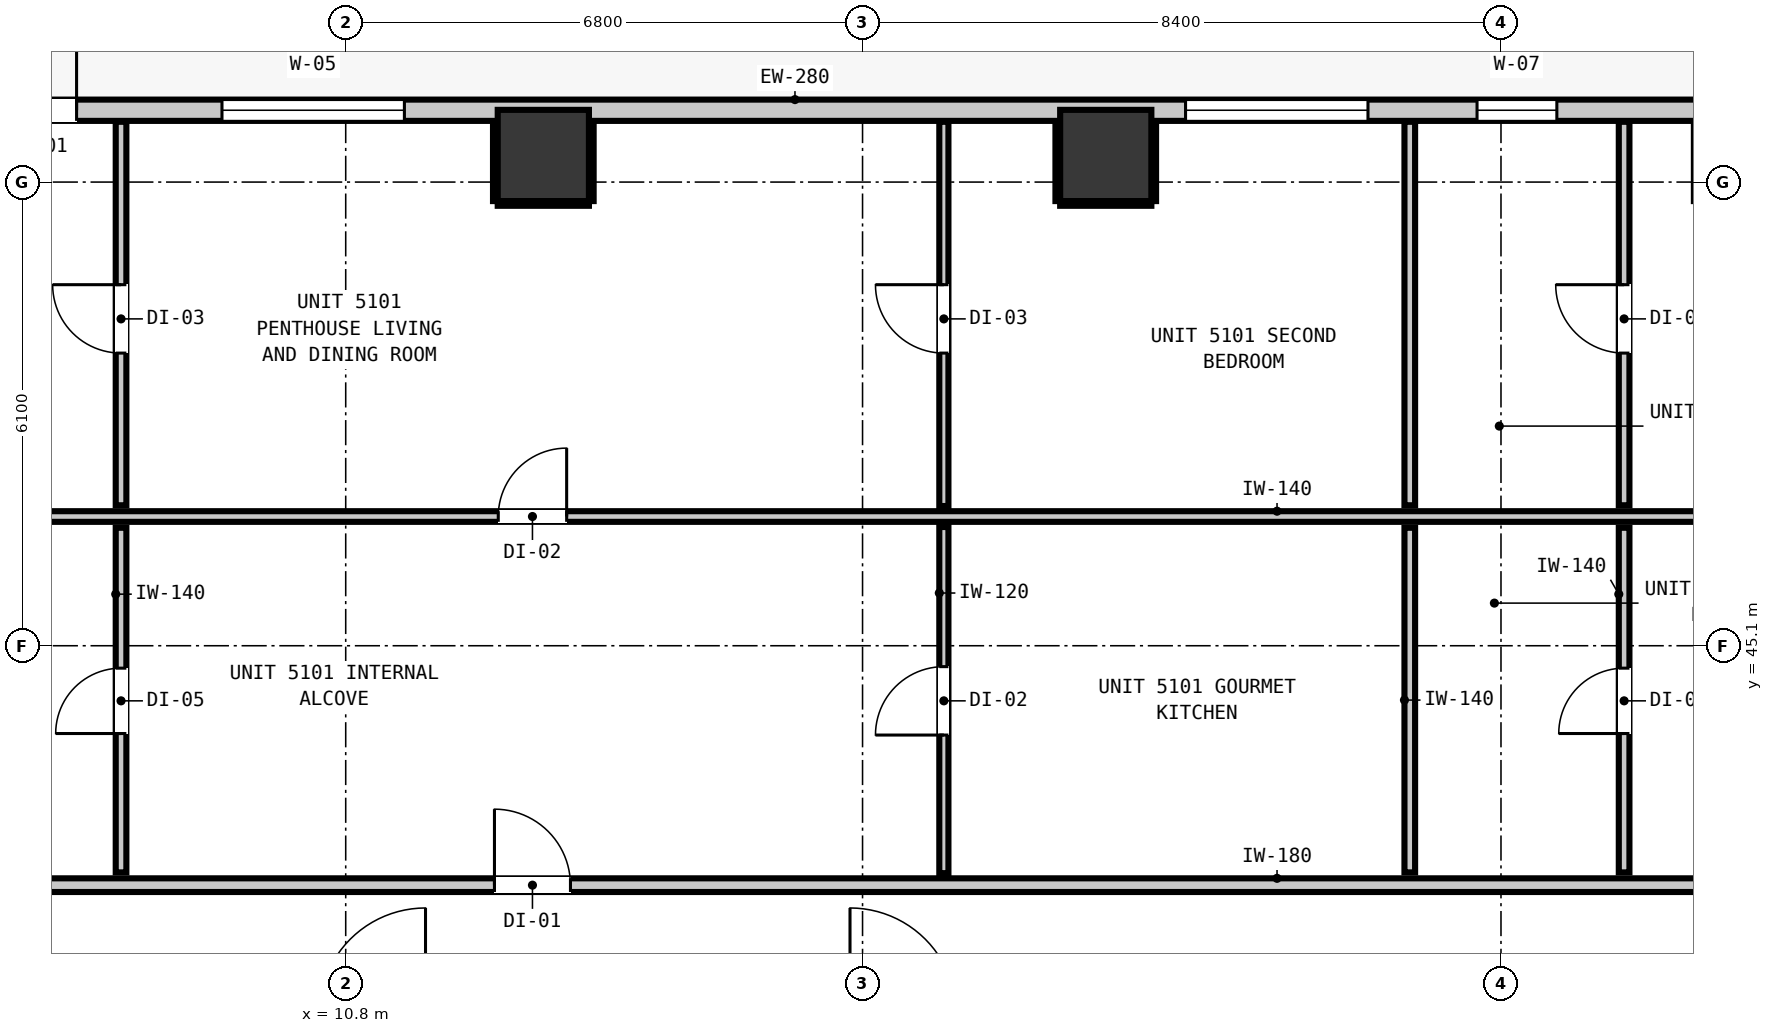
"""IFC4 building model, lengths in metres.
Left out: names, types, materials, properties, quantities, classifications, styles, units other than length and angle.
Written with IfcOpenShell. Run it as: python <this file> out.ifc"""

import sys

from ifc_helpers import new_model, si_unit, direction, frame, frame_2d, origin, origin_2d, place, context, subcontext, project, spatial, rectangle, extrude, element, fill, save


model = new_model("IFC4")
c1 = context("Model", 3, precision=1e-05, world=origin(), true_north=direction((0.0, 1.0)))
c2 = subcontext(c1, "Body", "Model", "MODEL_VIEW")
j1 = project(units=[si_unit("LENGTHUNIT", "METRE"), si_unit("PLANEANGLEUNIT", "RADIAN")], contexts=[c1])
p1 = place(None, origin())
s1 = spatial("IfcSite", under=j1, at=p1, CompositionType="ELEMENT")
p2 = place(p1, origin())
s2 = spatial("IfcBuilding", under=s1, at=p2, CompositionType="ELEMENT")
p3 = place(p2, frame((0.0, 0.0, 176.88)))
s3 = spatial("IfcBuildingStorey", under=s2, at=p3, CompositionType="ELEMENT", Elevation=176.88)
for number, where, z_axis, x_axis in (
    (1, (13.4, 51.55, 0.0), (0.0, 0.0, 1.0), (1.0, 0.0, 0.0)),
    (2, (20.8, 51.55, 0.0), (0.0, 0.0, 1.0), (1.0, 0.0, 0.0)),
):
    element("IfcColumn", number, at=place(p3, frame(where, z_axis=z_axis, x_axis=x_axis)), inside=s3, PredefinedType="COLUMN", context=c2, shape_type="SweptSolid", body=[
        extrude(rectangle(XDim=1.2, YDim=1.2, at=origin_2d()), origin(), (0.0, 0.0, 1.0), 3.32),
    ])
p4 = place(p3, frame((5.355, 52.145, 0.0), z_axis=(0.0, 0.0, 1.0), x_axis=(1.0, 0.0, 0.0)))
e3 = element("IfcWall", 3, at=p4, inside=s3, PredefinedType="STANDARD", context=c2, shape_type="SweptSolid", body=[
    extrude(rectangle(XDim=35.09, YDim=0.28, at=frame_2d((17.545, 0.0))), origin(), (0.0, 0.0, 1.0), 3.08),
])
p5 = place(p4, frame((0.904, 0.0, 0.0)))
e4 = element("IfcOpeningElement", 4, at=p5, cuts=e3, PredefinedType="OPENING", context=c2, shape_type="SweptSolid", body=[
    extrude(rectangle(XDim=1.0, YDim=2.15, at=frame_2d((0.5, 1.075))), frame((0.0, 0.15, 0.0), z_axis=(0.0, -1.0, 0.0), x_axis=(1.0, 0.0, 0.0)), (0.0, 0.0, 1.0), 0.3),
])
p6 = place(p4, frame((3.817, 0.0, 0.85)))
e5 = element("IfcOpeningElement", 5, at=p6, cuts=e3, PredefinedType="OPENING", context=c2, shape_type="SweptSolid", body=[
    extrude(rectangle(XDim=2.4, YDim=1.95, at=frame_2d((1.2, 0.975))), frame((0.0, 0.15, 0.0), z_axis=(0.0, -1.0, 0.0), x_axis=(1.0, 0.0, 0.0)), (0.0, 0.0, 1.0), 0.3),
])
p7 = place(p4, frame((16.495, 0.0, 0.85)))
e6 = element("IfcOpeningElement", 6, at=p7, cuts=e3, PredefinedType="OPENING", context=c2, shape_type="SweptSolid", body=[
    extrude(rectangle(XDim=2.4, YDim=1.95, at=frame_2d((1.2, 0.975))), frame((0.0, 0.15, 0.0), z_axis=(0.0, -1.0, 0.0), x_axis=(1.0, 0.0, 0.0)), (0.0, 0.0, 1.0), 0.3),
])
p8 = place(p4, frame((26.295, 0.0, 0.85)))
e7 = element("IfcOpeningElement", 7, at=p8, cuts=e3, PredefinedType="OPENING", context=c2, shape_type="SweptSolid", body=[
    extrude(rectangle(XDim=2.4, YDim=1.95, at=frame_2d((1.2, 0.975))), frame((0.0, 0.15, 0.0), z_axis=(0.0, -1.0, 0.0), x_axis=(1.0, 0.0, 0.0)), (0.0, 0.0, 1.0), 0.3),
])
p9 = place(p4, frame((20.33, 0.0, 0.85)))
e8 = element("IfcOpeningElement", 8, at=p9, cuts=e3, PredefinedType="OPENING", context=c2, shape_type="SweptSolid", body=[
    extrude(rectangle(XDim=1.05, YDim=1.65, at=frame_2d((0.525, 0.825))), frame((0.0, 0.15, 0.0), z_axis=(0.0, -1.0, 0.0), x_axis=(1.0, 0.0, 0.0)), (0.0, 0.0, 1.0), 0.3),
])
p10 = place(p4, frame((33.387, 0.0, 0.85)))
e9 = element("IfcOpeningElement", 9, at=p10, cuts=e3, PredefinedType="OPENING", context=c2, shape_type="SweptSolid", body=[
    extrude(rectangle(XDim=1.05, YDim=1.65, at=frame_2d((0.525, 0.825))), frame((0.0, 0.15, 0.0), z_axis=(0.0, -1.0, 0.0), x_axis=(1.0, 0.0, 0.0)), (0.0, 0.0, 1.0), 0.3),
])
p11 = place(p3, frame((3.207, 41.95, 0.0), z_axis=(0.0, 0.0, 1.0), x_axis=(1.0, 0.0, 0.0)))
e10 = element("IfcWall", 10, at=p11, inside=s3, PredefinedType="PARTITIONING", context=c2, shape_type="SweptSolid", body=[
    extrude(rectangle(XDim=39.386, YDim=0.18, at=frame_2d((19.693, 0.0))), origin(), (0.0, 0.0, 1.0), 3.08),
])
p12 = place(p11, frame((9.55, 0.0, 0.0)))
e11 = element("IfcOpeningElement", 11, at=p12, cuts=e10, PredefinedType="OPENING", context=c2, shape_type="SweptSolid", body=[
    extrude(rectangle(XDim=1.0, YDim=2.15, at=frame_2d((0.5, 1.075))), frame((0.0, 0.1, 0.0), z_axis=(0.0, -1.0, 0.0), x_axis=(1.0, 0.0, 0.0)), (0.0, 0.0, 1.0), 0.2),
])
p13 = place(p11, frame((29.143, 0.0, 0.0)))
e12 = element("IfcOpeningElement", 12, at=p13, cuts=e10, PredefinedType="OPENING", context=c2, shape_type="SweptSolid", body=[
    extrude(rectangle(XDim=1.0, YDim=2.15, at=frame_2d((0.5, 1.075))), frame((0.0, 0.1, 0.0), z_axis=(0.0, -1.0, 0.0), x_axis=(1.0, 0.0, 0.0)), (0.0, 0.0, 1.0), 0.2),
])
p14 = place(p3, frame((3.207, 46.8, 0.0), z_axis=(0.0, 0.0, 1.0), x_axis=(1.0, 0.0, 0.0)))
e13 = element("IfcWall", 13, at=p14, inside=s3, PredefinedType="PARTITIONING", context=c2, shape_type="SweptSolid", body=[
    extrude(rectangle(XDim=39.386, YDim=0.14, at=frame_2d((19.693, 0.0))), origin(), (0.0, 0.0, 1.0), 3.08),
])
p15 = place(p14, frame((9.6, 0.0, 0.0)))
e14 = element("IfcOpeningElement", 14, at=p15, cuts=e13, PredefinedType="OPENING", context=c2, shape_type="SweptSolid", body=[
    extrude(rectangle(XDim=0.9, YDim=2.1, at=frame_2d((0.45, 1.05))), frame((0.0, 0.08, 0.0), z_axis=(0.0, -1.0, 0.0), x_axis=(1.0, 0.0, 0.0)), (0.0, 0.0, 1.0), 0.16),
])
p16 = place(p14, frame((29.193, 0.0, 0.0)))
e15 = element("IfcOpeningElement", 15, at=p16, cuts=e13, PredefinedType="OPENING", context=c2, shape_type="SweptSolid", body=[
    extrude(rectangle(XDim=0.9, YDim=2.1, at=frame_2d((0.45, 1.05))), frame((0.0, 0.08, 0.0), z_axis=(0.0, -1.0, 0.0), x_axis=(1.0, 0.0, 0.0)), (0.0, 0.0, 1.0), 0.16),
])
p17 = place(p3, frame((7.844, 42.118, 0.0), z_axis=(0.0, 0.0, 1.0), x_axis=(0.0, 1.0, 0.0)))
e16 = element("IfcWall", 16, at=p17, inside=s3, PredefinedType="PARTITIONING", context=c2, shape_type="SweptSolid", body=[
    extrude(rectangle(XDim=4.534, YDim=0.14, at=frame_2d((2.267, 0.0))), origin(), (0.0, 0.0, 1.0), 3.08),
])
p18 = place(p17, frame((1.827, 0.0, 0.0)))
e17 = element("IfcOpeningElement", 17, at=p18, cuts=e16, PredefinedType="OPENING", context=c2, shape_type="SweptSolid", body=[
    extrude(rectangle(XDim=0.86, YDim=2.02, at=frame_2d((0.43, 1.01))), frame((0.0, 0.08, 0.0), z_axis=(0.0, -1.0, 0.0), x_axis=(1.0, 0.0, 0.0)), (0.0, 0.0, 1.0), 0.16),
])
p19 = place(p3, frame((7.844, 46.948, 0.0), z_axis=(0.0, 0.0, 1.0), x_axis=(0.0, 1.0, 0.0)))
e18 = element("IfcWall", 18, at=p19, inside=s3, PredefinedType="PARTITIONING", context=c2, shape_type="SweptSolid", body=[
    extrude(rectangle(XDim=5.045, YDim=0.14, at=frame_2d((2.522, 0.0))), origin(), (0.0, 0.0, 1.0), 3.08),
])
p20 = place(p19, frame((2.002, 0.0, 0.0)))
e19 = element("IfcOpeningElement", 19, at=p20, cuts=e18, PredefinedType="OPENING", context=c2, shape_type="SweptSolid", body=[
    extrude(rectangle(XDim=0.9, YDim=2.1, at=frame_2d((0.45, 1.05))), frame((0.0, 0.08, 0.0), z_axis=(0.0, -1.0, 0.0), x_axis=(1.0, 0.0, 0.0)), (0.0, 0.0, 1.0), 0.16),
])
p21 = place(p3, frame((24.8, 42.118, 0.0), z_axis=(0.0, 0.0, 1.0), x_axis=(0.0, 1.0, 0.0)))
e20 = element("IfcWall", 20, at=p21, inside=s3, PredefinedType="PARTITIONING", context=c2, shape_type="SweptSolid", body=[
    extrude(rectangle(XDim=4.534, YDim=0.14, at=frame_2d((2.267, 0.0))), origin(), (0.0, 0.0, 1.0), 3.08),
])
p22 = place(p3, frame((24.8, 46.948, 0.0), z_axis=(0.0, 0.0, 1.0), x_axis=(0.0, 1.0, 0.0)))
e21 = element("IfcWall", 21, at=p22, inside=s3, PredefinedType="PARTITIONING", context=c2, shape_type="SweptSolid", body=[
    extrude(rectangle(XDim=5.045, YDim=0.14, at=frame_2d((2.522, 0.0))), origin(), (0.0, 0.0, 1.0), 3.08),
])
p23 = place(p3, frame((27.62, 42.118, 0.0), z_axis=(0.0, 0.0, 1.0), x_axis=(0.0, 1.0, 0.0)))
e22 = element("IfcWall", 22, at=p23, inside=s3, PredefinedType="PARTITIONING", context=c2, shape_type="SweptSolid", body=[
    extrude(rectangle(XDim=4.534, YDim=0.14, at=frame_2d((2.267, 0.0))), origin(), (0.0, 0.0, 1.0), 3.08),
])
p24 = place(p23, frame((1.827, 0.0, 0.0)))
e23 = element("IfcOpeningElement", 23, at=p24, cuts=e22, PredefinedType="OPENING", context=c2, shape_type="SweptSolid", body=[
    extrude(rectangle(XDim=0.86, YDim=2.02, at=frame_2d((0.43, 1.01))), frame((0.0, 0.08, 0.0), z_axis=(0.0, -1.0, 0.0), x_axis=(1.0, 0.0, 0.0)), (0.0, 0.0, 1.0), 0.16),
])
p25 = place(p3, frame((27.62, 46.948, 0.0), z_axis=(0.0, 0.0, 1.0), x_axis=(0.0, 1.0, 0.0)))
e24 = element("IfcWall", 24, at=p25, inside=s3, PredefinedType="PARTITIONING", context=c2, shape_type="SweptSolid", body=[
    extrude(rectangle(XDim=5.045, YDim=0.14, at=frame_2d((2.522, 0.0))), origin(), (0.0, 0.0, 1.0), 3.08),
])
p26 = place(p25, frame((2.002, 0.0, 0.0)))
e25 = element("IfcOpeningElement", 25, at=p26, cuts=e24, PredefinedType="OPENING", context=c2, shape_type="SweptSolid", body=[
    extrude(rectangle(XDim=0.9, YDim=2.1, at=frame_2d((0.45, 1.05))), frame((0.0, 0.08, 0.0), z_axis=(0.0, -1.0, 0.0), x_axis=(1.0, 0.0, 0.0)), (0.0, 0.0, 1.0), 0.16),
])
p27 = place(p3, frame((18.67, 42.108, 0.0), z_axis=(0.0, 0.0, 1.0), x_axis=(0.0, 1.0, 0.0)))
e26 = element("IfcWall", 26, at=p27, inside=s3, PredefinedType="PARTITIONING", context=c2, shape_type="SweptSolid", body=[
    extrude(rectangle(XDim=4.554, YDim=0.12, at=frame_2d((2.277, 0.0))), origin(), (0.0, 0.0, 1.0), 3.08),
])
p28 = place(p27, frame((1.817, 0.0, 0.0)))
e27 = element("IfcOpeningElement", 27, at=p28, cuts=e26, PredefinedType="OPENING", context=c2, shape_type="SweptSolid", body=[
    extrude(rectangle(XDim=0.9, YDim=2.1, at=frame_2d((0.45, 1.05))), frame((0.0, 0.07, 0.0), z_axis=(0.0, -1.0, 0.0), x_axis=(1.0, 0.0, 0.0)), (0.0, 0.0, 1.0), 0.14),
])
p29 = place(p3, frame((18.67, 46.938, 0.0), z_axis=(0.0, 0.0, 1.0), x_axis=(0.0, 1.0, 0.0)))
e28 = element("IfcWall", 28, at=p29, inside=s3, PredefinedType="PARTITIONING", context=c2, shape_type="SweptSolid", body=[
    extrude(rectangle(XDim=5.055, YDim=0.12, at=frame_2d((2.527, 0.0))), origin(), (0.0, 0.0, 1.0), 3.08),
])
p30 = place(p29, frame((2.012, 0.0, 0.0)))
e29 = element("IfcOpeningElement", 29, at=p30, cuts=e28, PredefinedType="OPENING", context=c2, shape_type="SweptSolid", body=[
    extrude(rectangle(XDim=0.9, YDim=2.1, at=frame_2d((0.45, 1.05))), frame((0.0, 0.07, 0.0), z_axis=(0.0, -1.0, 0.0), x_axis=(1.0, 0.0, 0.0)), (0.0, 0.0, 1.0), 0.14),
])
p31 = place(p3, frame((12.8, 50.918, 0.0), z_axis=(0.0, 0.0, 1.0), x_axis=(1.0, 0.0, 0.0)))
e30 = element("IfcWall", 30, at=p31, inside=s3, PredefinedType="PARTITIONING", context=c2, shape_type="SweptSolid", body=[
    extrude(rectangle(XDim=1.2, YDim=0.06, at=frame_2d((0.6, 0.0))), origin(), (0.0, 0.0, 1.0), 1.45),
])
for number, where, z_axis, x_axis in (
    (31, (12.768, 50.95, 0.0), (0.0, 0.0, 1.0), (0.0, 1.0, 0.0)),
    (32, (14.032, 50.95, 0.0), (0.0, 0.0, 1.0), (0.0, 1.0, 0.0)),
):
    element("IfcWall", number, at=place(p3, frame(where, z_axis=z_axis, x_axis=x_axis)), inside=s3, PredefinedType="PARTITIONING", context=c2, shape_type="SweptSolid", body=[
        extrude(rectangle(XDim=1.04, YDim=0.06, at=frame_2d((0.52, 0.0))), origin(), (0.0, 0.0, 1.0), 1.45),
    ])
p32 = place(p3, frame((20.2, 50.918, 0.0), z_axis=(0.0, 0.0, 1.0), x_axis=(1.0, 0.0, 0.0)))
e33 = element("IfcWall", 33, at=p32, inside=s3, PredefinedType="PARTITIONING", context=c2, shape_type="SweptSolid", body=[
    extrude(rectangle(XDim=1.2, YDim=0.06, at=frame_2d((0.6, 0.0))), origin(), (0.0, 0.0, 1.0), 1.45),
])
for number, where, z_axis, x_axis in (
    (34, (20.168, 50.95, 0.0), (0.0, 0.0, 1.0), (0.0, 1.0, 0.0)),
    (35, (21.432, 50.95, 0.0), (0.0, 0.0, 1.0), (0.0, 1.0, 0.0)),
):
    element("IfcWall", number, at=place(p3, frame(where, z_axis=z_axis, x_axis=x_axis)), inside=s3, PredefinedType="PARTITIONING", context=c2, shape_type="SweptSolid", body=[
        extrude(rectangle(XDim=1.04, YDim=0.06, at=frame_2d((0.52, 0.0))), origin(), (0.0, 0.0, 1.0), 1.45),
    ])
p33 = place(p5, origin())
e36 = element("IfcDoor", 36, at=p33, inside=s3, OperationType="SINGLE_SWING_RIGHT", PredefinedType="DOOR", context=c2, shape_type="SweptSolid", body=[
    extrude(rectangle(XDim=1.0, YDim=2.15, at=frame_2d((0.5, 1.075))), frame((0.0, 0.025, 0.0), z_axis=(0.0, -1.0, 0.0), x_axis=(1.0, 0.0, 0.0)), (0.0, 0.0, 1.0), 0.05),
])
fill(e4, e36)
p34 = place(p6, origin())
e37 = element("IfcWindow", 37, at=p34, inside=s3, PartitioningType="SINGLE_PANEL", PredefinedType="WINDOW", context=c2, shape_type="SweptSolid", body=[
    extrude(rectangle(XDim=2.4, YDim=1.95, at=frame_2d((1.2, 0.975))), frame((0.0, 0.03, 0.0), z_axis=(0.0, -1.0, 0.0), x_axis=(1.0, 0.0, 0.0)), (0.0, 0.0, 1.0), 0.06),
])
fill(e5, e37)
p35 = place(p7, origin())
e38 = element("IfcWindow", 38, at=p35, inside=s3, PartitioningType="SINGLE_PANEL", PredefinedType="WINDOW", context=c2, shape_type="SweptSolid", body=[
    extrude(rectangle(XDim=2.4, YDim=1.95, at=frame_2d((1.2, 0.975))), frame((0.0, 0.03, 0.0), z_axis=(0.0, -1.0, 0.0), x_axis=(1.0, 0.0, 0.0)), (0.0, 0.0, 1.0), 0.06),
])
fill(e6, e38)
p36 = place(p9, origin())
e39 = element("IfcWindow", 39, at=p36, inside=s3, PartitioningType="SINGLE_PANEL", PredefinedType="WINDOW", context=c2, shape_type="SweptSolid", body=[
    extrude(rectangle(XDim=1.05, YDim=1.65, at=frame_2d((0.525, 0.825))), frame((0.0, 0.03, 0.0), z_axis=(0.0, -1.0, 0.0), x_axis=(1.0, 0.0, 0.0)), (0.0, 0.0, 1.0), 0.06),
])
fill(e8, e39)
p37 = place(p12, origin())
e40 = element("IfcDoor", 40, at=p37, inside=s3, OperationType="SINGLE_SWING_LEFT", PredefinedType="DOOR", context=c2, shape_type="SweptSolid", body=[
    extrude(rectangle(XDim=1.0, YDim=2.15, at=frame_2d((0.5, 1.075))), frame((0.0, 0.025, 0.0), z_axis=(0.0, -1.0, 0.0), x_axis=(1.0, 0.0, 0.0)), (0.0, 0.0, 1.0), 0.05),
])
fill(e11, e40)
p38 = place(p15, origin())
e41 = element("IfcDoor", 41, at=p38, inside=s3, OperationType="SINGLE_SWING_RIGHT", PredefinedType="DOOR", context=c2, shape_type="SweptSolid", body=[
    extrude(rectangle(XDim=0.9, YDim=2.1, at=frame_2d((0.45, 1.05))), frame((0.0, 0.025, 0.0), z_axis=(0.0, -1.0, 0.0), x_axis=(1.0, 0.0, 0.0)), (0.0, 0.0, 1.0), 0.05),
])
fill(e14, e41)
p39 = place(p18, origin())
e42 = element("IfcDoor", 42, at=p39, inside=s3, OperationType="SINGLE_SWING_LEFT", PredefinedType="DOOR", context=c2, shape_type="SweptSolid", body=[
    extrude(rectangle(XDim=0.86, YDim=2.02, at=frame_2d((0.43, 1.01))), frame((0.0, 0.025, 0.0), z_axis=(0.0, -1.0, 0.0), x_axis=(1.0, 0.0, 0.0)), (0.0, 0.0, 1.0), 0.05),
])
fill(e17, e42)
p40 = place(p20, origin())
e43 = element("IfcDoor", 43, at=p40, inside=s3, OperationType="SINGLE_SWING_RIGHT", PredefinedType="DOOR", context=c2, shape_type="SweptSolid", body=[
    extrude(rectangle(XDim=0.9, YDim=2.1, at=frame_2d((0.45, 1.05))), frame((0.0, 0.025, 0.0), z_axis=(0.0, -1.0, 0.0), x_axis=(1.0, 0.0, 0.0)), (0.0, 0.0, 1.0), 0.05),
])
fill(e19, e43)
p41 = place(p28, origin())
e44 = element("IfcDoor", 44, at=p41, inside=s3, OperationType="SINGLE_SWING_LEFT", PredefinedType="DOOR", context=c2, shape_type="SweptSolid", body=[
    extrude(rectangle(XDim=0.9, YDim=2.1, at=frame_2d((0.45, 1.05))), frame((0.0, 0.025, 0.0), z_axis=(0.0, -1.0, 0.0), x_axis=(1.0, 0.0, 0.0)), (0.0, 0.0, 1.0), 0.05),
])
fill(e27, e44)
p42 = place(p30, origin())
e45 = element("IfcDoor", 45, at=p42, inside=s3, OperationType="SINGLE_SWING_RIGHT", PredefinedType="DOOR", context=c2, shape_type="SweptSolid", body=[
    extrude(rectangle(XDim=0.9, YDim=2.1, at=frame_2d((0.45, 1.05))), frame((0.0, 0.025, 0.0), z_axis=(0.0, -1.0, 0.0), x_axis=(1.0, 0.0, 0.0)), (0.0, 0.0, 1.0), 0.05),
])
fill(e29, e45)
p43 = place(p24, origin())
e46 = element("IfcDoor", 46, at=p43, inside=s3, OperationType="SINGLE_SWING_LEFT", PredefinedType="DOOR", context=c2, shape_type="SweptSolid", body=[
    extrude(rectangle(XDim=0.86, YDim=2.02, at=frame_2d((0.43, 1.01))), frame((0.0, 0.025, 0.0), z_axis=(0.0, -1.0, 0.0), x_axis=(1.0, 0.0, 0.0)), (0.0, 0.0, 1.0), 0.05),
])
fill(e23, e46)
p44 = place(p26, origin())
e47 = element("IfcDoor", 47, at=p44, inside=s3, OperationType="SINGLE_SWING_RIGHT", PredefinedType="DOOR", context=c2, shape_type="SweptSolid", body=[
    extrude(rectangle(XDim=0.9, YDim=2.1, at=frame_2d((0.45, 1.05))), frame((0.0, 0.025, 0.0), z_axis=(0.0, -1.0, 0.0), x_axis=(1.0, 0.0, 0.0)), (0.0, 0.0, 1.0), 0.05),
])
fill(e25, e47)
save(model, sys.argv[1])
